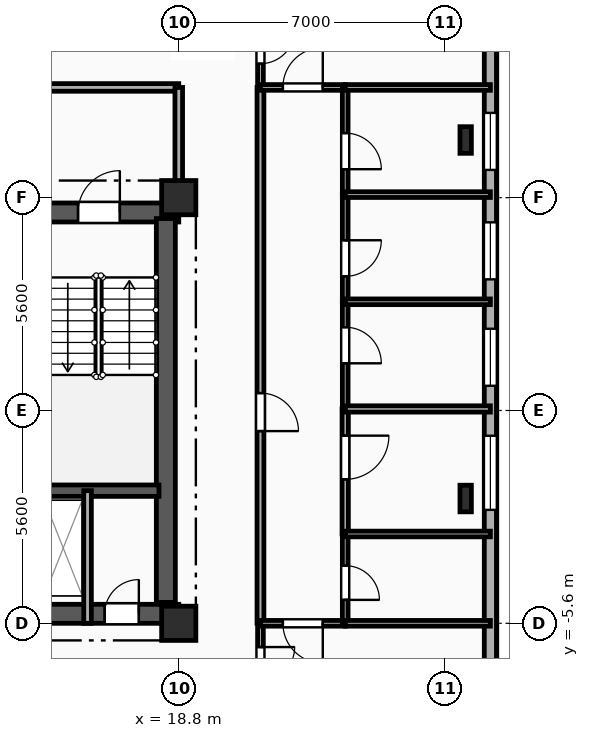
"""IFC4 building model, lengths in metres.
Left out: names, types, materials, properties, quantities, classifications, styles, units other than length and angle.
Written with IfcOpenShell. Run it as: python <this file> out.ifc"""

import sys

from ifc_helpers import new_model, si_unit, direction, frame, frame_2d, origin, origin_2d, place, context, subcontext, project, spatial, rectangle, i_section, extrude, element, fill, save


model = new_model("IFC4")
c1 = context("Model", 3, precision=1e-05, world=origin(), true_north=direction((0.0, 1.0)))
c2 = subcontext(c1, "Body", "Model", "MODEL_VIEW")
j1 = project(units=[si_unit("LENGTHUNIT", "METRE"), si_unit("PLANEANGLEUNIT", "RADIAN")], contexts=[c1])
p1 = place(None, origin())
s1 = spatial("IfcSite", under=j1, at=p1, CompositionType="ELEMENT")
p2 = place(p1, origin())
s2 = spatial("IfcBuilding", under=s1, at=p2, CompositionType="ELEMENT")
p3 = place(p2, frame((0.0, 0.0, 157.8)))
s3 = spatial("IfcBuildingStorey", under=s2, at=p3, CompositionType="ELEMENT", Elevation=157.8)
for number, where, z_axis, x_axis in (
    (1, (18.8, -5.6, 0.0), (0.0, 0.0, 1.0), (1.0, 0.0, 0.0)),
    (2, (18.8, 5.6, 0.0), (0.0, 0.0, 1.0), (1.0, 0.0, 0.0)),
):
    element("IfcColumn", number, at=place(p3, frame(where, z_axis=z_axis, x_axis=x_axis)), inside=s3, PredefinedType="COLUMN", context=c2, shape_type="SweptSolid", body=[
        extrude(rectangle(XDim=0.9, YDim=0.9, at=origin_2d()), origin(), (0.0, 0.0, 1.0), 3.35),
    ])
for number, where, z_axis, x_axis in (
    (3, (26.35, -2.317, 0.0), (0.0, 0.0, 1.0), (1.0, 0.0, 0.0)),
    (4, (26.35, 7.117, 0.0), (0.0, 0.0, 1.0), (1.0, 0.0, 0.0)),
):
    element("IfcColumn", number, at=place(p3, frame(where, z_axis=z_axis, x_axis=x_axis)), inside=s3, PredefinedType="COLUMN", context=c2, shape_type="SweptSolid", body=[
        extrude(i_section(OverallWidth=0.3, OverallDepth=0.7, WebThickness=0.017, FlangeThickness=0.032, FilletRadius=0.027, at=origin_2d()), origin(), (0.0, 0.0, 1.0), 3.35),
    ])
p4 = place(p3, frame((27.0, 17.2, 0.0), z_axis=(0.0, 0.0, 1.0), x_axis=(0.0, -1.0, 0.0)))
e5 = element("IfcWall", 5, at=p4, inside=s3, PredefinedType="SOLIDWALL", context=c2, shape_type="SweptSolid", body=[
    extrude(rectangle(XDim=29.6, YDim=0.32, at=frame_2d((14.8, 0.0))), origin(), (0.0, 0.0, 1.0), 3.04),
])
p5 = place(p4, frame((3.775, 0.0, 0.85)))
e6 = element("IfcOpeningElement", 6, at=p5, cuts=e5, PredefinedType="OPENING", context=c2, shape_type="SweptSolid", body=[
    extrude(rectangle(XDim=1.65, YDim=1.85, at=frame_2d((0.825, 0.925))), frame((0.0, 0.17, 0.0), z_axis=(0.0, -1.0, 0.0), x_axis=(1.0, 0.0, 0.0)), (0.0, 0.0, 1.0), 0.34),
])
p6 = place(p4, frame((9.37, 0.0, 0.85)))
e7 = element("IfcOpeningElement", 7, at=p6, cuts=e5, PredefinedType="OPENING", context=c2, shape_type="SweptSolid", body=[
    extrude(rectangle(XDim=1.5, YDim=1.85, at=frame_2d((0.75, 0.925))), frame((0.0, 0.17, 0.0), z_axis=(0.0, -1.0, 0.0), x_axis=(1.0, 0.0, 0.0)), (0.0, 0.0, 1.0), 0.34),
])
p7 = place(p4, frame((12.25, 0.0, 0.85)))
e8 = element("IfcOpeningElement", 8, at=p7, cuts=e5, PredefinedType="OPENING", context=c2, shape_type="SweptSolid", body=[
    extrude(rectangle(XDim=1.5, YDim=1.85, at=frame_2d((0.75, 0.925))), frame((0.0, 0.17, 0.0), z_axis=(0.0, -1.0, 0.0), x_axis=(1.0, 0.0, 0.0)), (0.0, 0.0, 1.0), 0.34),
])
p8 = place(p4, frame((15.05, 0.0, 0.85)))
e9 = element("IfcOpeningElement", 9, at=p8, cuts=e5, PredefinedType="OPENING", context=c2, shape_type="SweptSolid", body=[
    extrude(rectangle(XDim=1.5, YDim=1.85, at=frame_2d((0.75, 0.925))), frame((0.0, 0.17, 0.0), z_axis=(0.0, -1.0, 0.0), x_axis=(1.0, 0.0, 0.0)), (0.0, 0.0, 1.0), 0.34),
])
p9 = place(p4, frame((17.865, 0.0, 0.85)))
e10 = element("IfcOpeningElement", 10, at=p9, cuts=e5, PredefinedType="OPENING", context=c2, shape_type="SweptSolid", body=[
    extrude(rectangle(XDim=1.95, YDim=1.85, at=frame_2d((0.975, 0.925))), frame((0.0, 0.17, 0.0), z_axis=(0.0, -1.0, 0.0), x_axis=(1.0, 0.0, 0.0)), (0.0, 0.0, 1.0), 0.34),
])
p10 = place(p4, frame((25.175, 0.0, 0.85)))
e11 = element("IfcOpeningElement", 11, at=p10, cuts=e5, PredefinedType="OPENING", context=c2, shape_type="SweptSolid", body=[
    extrude(rectangle(XDim=1.65, YDim=1.85, at=frame_2d((0.825, 0.925))), frame((0.0, 0.17, 0.0), z_axis=(0.0, -1.0, 0.0), x_axis=(1.0, 0.0, 0.0)), (0.0, 0.0, 1.0), 0.34),
])
p11 = place(p3, frame((9.2, 5.21, 0.0), z_axis=(0.0, 0.0, 1.0), x_axis=(1.0, 0.0, 0.0)))
e12 = element("IfcWall", 12, at=p11, inside=s3, PredefinedType="SHEAR", context=c2, shape_type="SweptSolid", body=[
    extrude(rectangle(XDim=9.6, YDim=0.5, at=frame_2d((4.8, 0.0))), origin(), (0.0, 0.0, 1.0), 3.04),
])
p12 = place(p11, frame((6.95, 0.0, 0.0)))
e13 = element("IfcOpeningElement", 13, at=p12, cuts=e12, PredefinedType="OPENING", context=c2, shape_type="SweptSolid", body=[
    extrude(rectangle(XDim=1.1, YDim=2.15, at=frame_2d((0.55, 1.075))), frame((0.0, 0.26, 0.0), z_axis=(0.0, -1.0, 0.0), x_axis=(1.0, 0.0, 0.0)), (0.0, 0.0, 1.0), 0.52),
])
p13 = place(p11, frame((3.775, 0.0, 0.0)))
e14 = element("IfcOpeningElement", 14, at=p13, cuts=e12, PredefinedType="OPENING", context=c2, shape_type="SweptSolid", body=[
    extrude(rectangle(XDim=1.05, YDim=2.1, at=frame_2d((0.525, 1.05))), frame((0.0, 0.26, 0.0), z_axis=(0.0, -1.0, 0.0), x_axis=(1.0, 0.0, 0.0)), (0.0, 0.0, 1.0), 0.52),
])
p14 = place(p3, frame((9.2, -5.35, 0.0), z_axis=(0.0, 0.0, 1.0), x_axis=(1.0, 0.0, 0.0)))
e15 = element("IfcWall", 15, at=p14, inside=s3, PredefinedType="SHEAR", context=c2, shape_type="SweptSolid", body=[
    extrude(rectangle(XDim=9.6, YDim=0.5, at=frame_2d((4.8, 0.0))), origin(), (0.0, 0.0, 1.0), 3.04),
])
p15 = place(p14, frame((7.65, 0.0, 0.0)))
e16 = element("IfcOpeningElement", 16, at=p15, cuts=e15, PredefinedType="OPENING", context=c2, shape_type="SweptSolid", body=[
    extrude(rectangle(XDim=0.9, YDim=2.1, at=frame_2d((0.45, 1.05))), frame((0.0, 0.26, 0.0), z_axis=(0.0, -1.0, 0.0), x_axis=(1.0, 0.0, 0.0)), (0.0, 0.0, 1.0), 0.52),
])
p16 = place(p3, frame((18.46, -5.05, 0.0), z_axis=(0.0, 0.0, 1.0), x_axis=(0.0, 1.0, 0.0)))
e17 = element("IfcWall", 17, at=p16, inside=s3, PredefinedType="SHEAR", context=c2, shape_type="SweptSolid", body=[
    extrude(rectangle(XDim=10.1, YDim=0.5, at=frame_2d((5.05, 0.0))), origin(), (0.0, 0.0, 1.0), 3.04),
])
p17 = place(p3, frame((15.1, -2.11, 0.0), z_axis=(0.0, 0.0, 1.0), x_axis=(1.0, 0.0, 0.0)))
e18 = element("IfcWall", 18, at=p17, inside=s3, PredefinedType="SHEAR", context=c2, shape_type="SweptSolid", body=[
    extrude(rectangle(XDim=3.18, YDim=0.3, at=frame_2d((1.59, 0.0))), origin(), (0.0, 0.0, 1.0), 3.04),
])
p18 = place(p3, frame((16.4, -2.11, 0.0), z_axis=(0.0, 0.0, 1.0), x_axis=(0.0, -1.0, 0.0)))
e19 = element("IfcWall", 19, at=p18, inside=s3, PredefinedType="PARTITIONING", context=c2, shape_type="SweptSolid", body=[
    extrude(rectangle(XDim=3.49, YDim=0.2, at=frame_2d((1.745, 0.0))), origin(), (0.0, 0.0, 1.0), 3.04),
])
p19 = place(p3, frame((18.8, 8.5, 0.0), z_axis=(0.0, 0.0, 1.0), x_axis=(-1.0, 0.0, 0.0)))
e20 = element("IfcWall", 20, at=p19, inside=s3, PredefinedType="PARTITIONING", context=c2, shape_type="SweptSolid", body=[
    extrude(rectangle(XDim=6.8, YDim=0.2, at=frame_2d((3.4, 0.0))), origin(), (0.0, 0.0, 1.0), 3.04),
])
p20 = place(p19, frame((3.985, 0.0, 0.0)))
e21 = element("IfcOpeningElement", 21, at=p20, cuts=e20, PredefinedType="OPENING", context=c2, shape_type="SweptSolid", body=[
    extrude(rectangle(XDim=1.1, YDim=2.15, at=frame_2d((0.55, 1.075))), frame((0.0, 0.11, 0.0), z_axis=(0.0, -1.0, 0.0), x_axis=(1.0, 0.0, 0.0)), (0.0, 0.0, 1.0), 0.22),
])
p21 = place(p3, frame((18.8, 5.6, 0.0), z_axis=(0.0, 0.0, 1.0), x_axis=(0.0, 1.0, 0.0)))
e22 = element("IfcWall", 22, at=p21, inside=s3, PredefinedType="PARTITIONING", context=c2, shape_type="SweptSolid", body=[
    extrude(rectangle(XDim=2.9, YDim=0.2, at=frame_2d((1.45, 0.0))), origin(), (0.0, 0.0, 1.0), 2.525),
])
p22 = place(p3, frame((20.95, 10.65, 0.0), z_axis=(0.0, 0.0, 1.0), x_axis=(0.0, -1.0, 0.0)))
e23 = element("IfcWall", 23, at=p22, inside=s3, PredefinedType="PARTITIONING", context=c2, shape_type="SweptSolid", body=[
    extrude(rectangle(XDim=2.15, YDim=0.15, at=frame_2d((1.075, 0.0))), origin(), (0.0, 0.0, 1.0), 3.04),
])
p23 = place(p22, frame((0.625, 0.0, 0.0)))
e24 = element("IfcOpeningElement", 24, at=p23, cuts=e23, PredefinedType="OPENING", context=c2, shape_type="SweptSolid", body=[
    extrude(rectangle(XDim=0.9, YDim=2.1, at=frame_2d((0.45, 1.05))), frame((0.0, 0.085, 0.0), z_axis=(0.0, -1.0, 0.0), x_axis=(1.0, 0.0, 0.0)), (0.0, 0.0, 1.0), 0.17),
])
p24 = place(p3, frame((20.95, -5.6, 0.0), z_axis=(0.0, 0.0, 1.0), x_axis=(0.0, -1.0, 0.0)))
e25 = element("IfcWall", 25, at=p24, inside=s3, PredefinedType="PARTITIONING", context=c2, shape_type="SweptSolid", body=[
    extrude(rectangle(XDim=2.15, YDim=0.15, at=frame_2d((1.075, 0.0))), origin(), (0.0, 0.0, 1.0), 3.04),
])
p25 = place(p24, frame((0.625, 0.0, 0.0)))
e26 = element("IfcOpeningElement", 26, at=p25, cuts=e25, PredefinedType="OPENING", context=c2, shape_type="SweptSolid", body=[
    extrude(rectangle(XDim=0.9, YDim=2.1, at=frame_2d((0.45, 1.05))), frame((0.0, 0.085, 0.0), z_axis=(0.0, -1.0, 0.0), x_axis=(1.0, 0.0, 0.0)), (0.0, 0.0, 1.0), 0.17),
])
p26 = place(p3, frame((20.95, 8.5, 0.0), z_axis=(0.0, 0.0, 1.0), x_axis=(0.0, -1.0, 0.0)))
e27 = element("IfcWall", 27, at=p26, inside=s3, PredefinedType="PARTITIONING", context=c2, shape_type="SweptSolid", body=[
    extrude(rectangle(XDim=14.1, YDim=0.18, at=frame_2d((7.05, 0.0))), origin(), (0.0, 0.0, 1.0), 3.04),
])
p27 = place(p26, frame((8.042, 0.0, 0.0)))
e28 = element("IfcOpeningElement", 28, at=p27, cuts=e27, PredefinedType="OPENING", context=c2, shape_type="SweptSolid", body=[
    extrude(rectangle(XDim=1.0, YDim=2.15, at=frame_2d((0.5, 1.075))), frame((0.0, 0.1, 0.0), z_axis=(0.0, -1.0, 0.0), x_axis=(1.0, 0.0, 0.0)), (0.0, 0.0, 1.0), 0.2),
])
p28 = place(p3, frame((20.95, 8.5, 0.0), z_axis=(0.0, 0.0, 1.0), x_axis=(1.0, 0.0, 0.0)))
e29 = element("IfcWall", 29, at=p28, inside=s3, PredefinedType="PARTITIONING", context=c2, shape_type="SweptSolid", body=[
    extrude(rectangle(XDim=2.23, YDim=0.15, at=frame_2d((1.115, 0.0))), origin(), (0.0, 0.0, 1.0), 3.04),
])
p29 = place(p28, frame((0.59, 0.0, 0.0)))
e30 = element("IfcOpeningElement", 30, at=p29, cuts=e29, PredefinedType="OPENING", context=c2, shape_type="SweptSolid", body=[
    extrude(rectangle(XDim=1.05, YDim=2.15, at=frame_2d((0.525, 1.075))), frame((0.0, 0.085, 0.0), z_axis=(0.0, -1.0, 0.0), x_axis=(1.0, 0.0, 0.0)), (0.0, 0.0, 1.0), 0.17),
])
p30 = place(p3, frame((23.18, -5.6, 0.0), z_axis=(0.0, 0.0, 1.0), x_axis=(-1.0, 0.0, 0.0)))
e31 = element("IfcWall", 31, at=p30, inside=s3, PredefinedType="PARTITIONING", context=c2, shape_type="SweptSolid", body=[
    extrude(rectangle(XDim=2.23, YDim=0.15, at=frame_2d((1.115, 0.0))), origin(), (0.0, 0.0, 1.0), 3.04),
])
p31 = place(p30, frame((0.59, 0.0, 0.0)))
e32 = element("IfcOpeningElement", 32, at=p31, cuts=e31, PredefinedType="OPENING", context=c2, shape_type="SweptSolid", body=[
    extrude(rectangle(XDim=1.05, YDim=2.15, at=frame_2d((0.525, 1.075))), frame((0.0, 0.085, 0.0), z_axis=(0.0, -1.0, 0.0), x_axis=(1.0, 0.0, 0.0)), (0.0, 0.0, 1.0), 0.17),
])
p32 = place(p3, frame((23.18, -3.25, 0.0), z_axis=(0.0, 0.0, 1.0), x_axis=(0.0, -1.0, 0.0)))
e33 = element("IfcWall", 33, at=p32, inside=s3, PredefinedType="PLUMBINGWALL", context=c2, shape_type="SweptSolid", body=[
    extrude(rectangle(XDim=2.35, YDim=0.15, at=frame_2d((1.175, 0.0))), origin(), (0.0, 0.0, 1.0), 3.04),
])
p33 = place(p32, frame((0.834, 0.0, 0.0)))
e34 = element("IfcOpeningElement", 34, at=p33, cuts=e33, PredefinedType="OPENING", context=c2, shape_type="SweptSolid", body=[
    extrude(rectangle(XDim=0.9, YDim=2.1, at=frame_2d((0.45, 1.05))), frame((0.0, 0.085, 0.0), z_axis=(0.0, -1.0, 0.0), x_axis=(1.0, 0.0, 0.0)), (0.0, 0.0, 1.0), 0.17),
])
p34 = place(p3, frame((23.18, 0.04, 0.0), z_axis=(0.0, 0.0, 1.0), x_axis=(0.0, -1.0, 0.0)))
e35 = element("IfcWall", 35, at=p34, inside=s3, PredefinedType="PARTITIONING", context=c2, shape_type="SweptSolid", body=[
    extrude(rectangle(XDim=3.29, YDim=0.165, at=frame_2d((1.645, 0.0))), origin(), (0.0, 0.0, 1.0), 3.04),
])
p35 = place(p34, frame((0.702, 0.0, 0.0)))
e36 = element("IfcOpeningElement", 36, at=p35, cuts=e35, PredefinedType="OPENING", context=c2, shape_type="SweptSolid", body=[
    extrude(rectangle(XDim=1.15, YDim=2.15, at=frame_2d((0.575, 1.075))), frame((0.0, 0.093, 0.0), z_axis=(0.0, -1.0, 0.0), x_axis=(1.0, 0.0, 0.0)), (0.0, 0.0, 1.0), 0.185),
])
p36 = place(p3, frame((23.18, 2.86, 0.0), z_axis=(0.0, 0.0, 1.0), x_axis=(0.0, -1.0, 0.0)))
e37 = element("IfcWall", 37, at=p36, inside=s3, PredefinedType="PARTITIONING", context=c2, shape_type="SweptSolid", body=[
    extrude(rectangle(XDim=2.82, YDim=0.15, at=frame_2d((1.41, 0.0))), origin(), (0.0, 0.0, 1.0), 3.04),
])
p37 = place(p36, frame((0.669, 0.0, 0.0)))
e38 = element("IfcOpeningElement", 38, at=p37, cuts=e37, PredefinedType="OPENING", context=c2, shape_type="SweptSolid", body=[
    extrude(rectangle(XDim=0.95, YDim=2.1, at=frame_2d((0.475, 1.05))), frame((0.0, 0.085, 0.0), z_axis=(0.0, -1.0, 0.0), x_axis=(1.0, 0.0, 0.0)), (0.0, 0.0, 1.0), 0.17),
])
p38 = place(p3, frame((23.18, 5.68, 0.0), z_axis=(0.0, 0.0, 1.0), x_axis=(0.0, -1.0, 0.0)))
e39 = element("IfcWall", 39, at=p38, inside=s3, PredefinedType="PARTITIONING", context=c2, shape_type="SweptSolid", body=[
    extrude(rectangle(XDim=2.82, YDim=0.15, at=frame_2d((1.41, 0.0))), origin(), (0.0, 0.0, 1.0), 3.04),
])
p39 = place(p38, frame((1.201, 0.0, 0.0)))
e40 = element("IfcOpeningElement", 40, at=p39, cuts=e39, PredefinedType="OPENING", context=c2, shape_type="SweptSolid", body=[
    extrude(rectangle(XDim=0.95, YDim=2.1, at=frame_2d((0.475, 1.05))), frame((0.0, 0.085, 0.0), z_axis=(0.0, -1.0, 0.0), x_axis=(1.0, 0.0, 0.0)), (0.0, 0.0, 1.0), 0.17),
])
p40 = place(p3, frame((23.18, 8.5, 0.0), z_axis=(0.0, 0.0, 1.0), x_axis=(0.0, -1.0, 0.0)))
e41 = element("IfcWall", 41, at=p40, inside=s3, PredefinedType="PARTITIONING", context=c2, shape_type="SweptSolid", body=[
    extrude(rectangle(XDim=2.82, YDim=0.15, at=frame_2d((1.41, 0.0))), origin(), (0.0, 0.0, 1.0), 3.04),
])
p41 = place(p40, frame((1.201, 0.0, 0.0)))
e42 = element("IfcOpeningElement", 42, at=p41, cuts=e41, PredefinedType="OPENING", context=c2, shape_type="SweptSolid", body=[
    extrude(rectangle(XDim=0.95, YDim=2.1, at=frame_2d((0.475, 1.05))), frame((0.0, 0.085, 0.0), z_axis=(0.0, -1.0, 0.0), x_axis=(1.0, 0.0, 0.0)), (0.0, 0.0, 1.0), 0.17),
])
p42 = place(p3, frame((27.0, 8.5, 0.0), z_axis=(0.0, 0.0, 1.0), x_axis=(-1.0, 0.0, 0.0)))
e43 = element("IfcWall", 43, at=p42, inside=s3, PredefinedType="PARTITIONING", context=c2, shape_type="SweptSolid", body=[
    extrude(rectangle(XDim=3.82, YDim=0.15, at=frame_2d((1.91, 0.0))), origin(), (0.0, 0.0, 1.0), 3.04),
])
for number, where, z_axis, x_axis in (
    (44, (23.18, -5.6, 0.0), (0.0, 0.0, 1.0), (1.0, 0.0, 0.0)),
    (45, (23.18, -3.25, 0.0), (0.0, 0.0, 1.0), (1.0, 0.0, 0.0)),
):
    element("IfcWall", number, at=place(p3, frame(where, z_axis=z_axis, x_axis=x_axis)), inside=s3, PredefinedType="PLUMBINGWALL", context=c2, shape_type="SweptSolid", body=[
        extrude(rectangle(XDim=3.82, YDim=0.15, at=frame_2d((1.91, 0.0))), origin(), (0.0, 0.0, 1.0), 3.04),
    ])
p43 = place(p3, frame((23.18, 0.04, 0.0), z_axis=(0.0, 0.0, 1.0), x_axis=(1.0, 0.0, 0.0)))
e46 = element("IfcWall", 46, at=p43, inside=s3, PredefinedType="PARTITIONING", context=c2, shape_type="SweptSolid", body=[
    extrude(rectangle(XDim=3.82, YDim=0.165, at=frame_2d((1.91, 0.0))), origin(), (0.0, 0.0, 1.0), 3.04),
])
for number, where, z_axis, x_axis in (
    (47, (23.18, 2.86, 0.0), (0.0, 0.0, 1.0), (1.0, 0.0, 0.0)),
    (48, (23.18, 5.68, 0.0), (0.0, 0.0, 1.0), (1.0, 0.0, 0.0)),
):
    element("IfcWall", number, at=place(p3, frame(where, z_axis=z_axis, x_axis=x_axis)), inside=s3, PredefinedType="PARTITIONING", context=c2, shape_type="SweptSolid", body=[
        extrude(rectangle(XDim=3.82, YDim=0.15, at=frame_2d((1.91, 0.0))), origin(), (0.0, 0.0, 1.0), 3.04),
    ])
p44 = place(p6, origin())
e49 = element("IfcWindow", 49, at=p44, inside=s3, PartitioningType="SINGLE_PANEL", PredefinedType="WINDOW", context=c2, shape_type="SweptSolid", body=[
    extrude(rectangle(XDim=1.5, YDim=1.85, at=frame_2d((0.75, 0.925))), frame((0.0, 0.03, 0.0), z_axis=(0.0, -1.0, 0.0), x_axis=(1.0, 0.0, 0.0)), (0.0, 0.0, 1.0), 0.06),
])
fill(e7, e49)
p45 = place(p7, origin())
e50 = element("IfcWindow", 50, at=p45, inside=s3, PartitioningType="SINGLE_PANEL", PredefinedType="WINDOW", context=c2, shape_type="SweptSolid", body=[
    extrude(rectangle(XDim=1.5, YDim=1.85, at=frame_2d((0.75, 0.925))), frame((0.0, 0.03, 0.0), z_axis=(0.0, -1.0, 0.0), x_axis=(1.0, 0.0, 0.0)), (0.0, 0.0, 1.0), 0.06),
])
fill(e8, e50)
p46 = place(p8, origin())
e51 = element("IfcWindow", 51, at=p46, inside=s3, PartitioningType="SINGLE_PANEL", PredefinedType="WINDOW", context=c2, shape_type="SweptSolid", body=[
    extrude(rectangle(XDim=1.5, YDim=1.85, at=frame_2d((0.75, 0.925))), frame((0.0, 0.03, 0.0), z_axis=(0.0, -1.0, 0.0), x_axis=(1.0, 0.0, 0.0)), (0.0, 0.0, 1.0), 0.06),
])
fill(e9, e51)
p47 = place(p9, origin())
e52 = element("IfcWindow", 52, at=p47, inside=s3, PartitioningType="SINGLE_PANEL", PredefinedType="WINDOW", context=c2, shape_type="SweptSolid", body=[
    extrude(rectangle(XDim=1.95, YDim=1.85, at=frame_2d((0.975, 0.925))), frame((0.0, 0.03, 0.0), z_axis=(0.0, -1.0, 0.0), x_axis=(1.0, 0.0, 0.0)), (0.0, 0.0, 1.0), 0.06),
])
fill(e10, e52)
p48 = place(p12, origin())
e53 = element("IfcDoor", 53, at=p48, inside=s3, OperationType="SINGLE_SWING_RIGHT", PredefinedType="DOOR", context=c2, shape_type="SweptSolid", body=[
    extrude(rectangle(XDim=1.1, YDim=2.15, at=frame_2d((0.55, 1.075))), frame((0.0, 0.025, 0.0), z_axis=(0.0, -1.0, 0.0), x_axis=(1.0, 0.0, 0.0)), (0.0, 0.0, 1.0), 0.05),
])
fill(e13, e53)
p49 = place(p15, origin())
e54 = element("IfcDoor", 54, at=p49, inside=s3, OperationType="SINGLE_SWING_RIGHT", PredefinedType="DOOR", context=c2, shape_type="SweptSolid", body=[
    extrude(rectangle(XDim=0.9, YDim=2.1, at=frame_2d((0.45, 1.05))), frame((0.0, 0.025, 0.0), z_axis=(0.0, -1.0, 0.0), x_axis=(1.0, 0.0, 0.0)), (0.0, 0.0, 1.0), 0.05),
])
fill(e16, e54)
p50 = place(p23, origin())
e55 = element("IfcDoor", 55, at=p50, inside=s3, OperationType="SINGLE_SWING_LEFT", PredefinedType="DOOR", context=c2, shape_type="SweptSolid", body=[
    extrude(rectangle(XDim=0.9, YDim=2.1, at=frame_2d((0.45, 1.05))), frame((0.0, 0.025, 0.0), z_axis=(0.0, -1.0, 0.0), x_axis=(1.0, 0.0, 0.0)), (0.0, 0.0, 1.0), 0.05),
])
fill(e24, e55)
p51 = place(p25, origin())
e56 = element("IfcDoor", 56, at=p51, inside=s3, OperationType="SINGLE_SWING_LEFT", PredefinedType="DOOR", context=c2, shape_type="SweptSolid", body=[
    extrude(rectangle(XDim=0.9, YDim=2.1, at=frame_2d((0.45, 1.05))), frame((0.0, 0.025, 0.0), z_axis=(0.0, -1.0, 0.0), x_axis=(1.0, 0.0, 0.0)), (0.0, 0.0, 1.0), 0.05),
])
fill(e26, e56)
p52 = place(p27, origin())
e57 = element("IfcDoor", 57, at=p52, inside=s3, OperationType="SINGLE_SWING_RIGHT", PredefinedType="DOOR", context=c2, shape_type="SweptSolid", body=[
    extrude(rectangle(XDim=1.0, YDim=2.15, at=frame_2d((0.5, 1.075))), frame((0.0, 0.025, 0.0), z_axis=(0.0, -1.0, 0.0), x_axis=(1.0, 0.0, 0.0)), (0.0, 0.0, 1.0), 0.05),
])
fill(e28, e57)
p53 = place(p29, origin())
e58 = element("IfcDoor", 58, at=p53, inside=s3, OperationType="SINGLE_SWING_RIGHT", PredefinedType="DOOR", context=c2, shape_type="SweptSolid", body=[
    extrude(rectangle(XDim=1.05, YDim=2.15, at=frame_2d((0.525, 1.075))), frame((0.0, 0.025, 0.0), z_axis=(0.0, -1.0, 0.0), x_axis=(1.0, 0.0, 0.0)), (0.0, 0.0, 1.0), 0.05),
])
fill(e30, e58)
p54 = place(p31, origin())
e59 = element("IfcDoor", 59, at=p54, inside=s3, OperationType="SINGLE_SWING_LEFT", PredefinedType="DOOR", context=c2, shape_type="SweptSolid", body=[
    extrude(rectangle(XDim=1.05, YDim=2.15, at=frame_2d((0.525, 1.075))), frame((0.0, 0.025, 0.0), z_axis=(0.0, -1.0, 0.0), x_axis=(1.0, 0.0, 0.0)), (0.0, 0.0, 1.0), 0.05),
])
fill(e32, e59)
p55 = place(p33, origin())
e60 = element("IfcDoor", 60, at=p55, inside=s3, OperationType="SINGLE_SWING_RIGHT", PredefinedType="DOOR", context=c2, shape_type="SweptSolid", body=[
    extrude(rectangle(XDim=0.9, YDim=2.1, at=frame_2d((0.45, 1.05))), frame((0.0, 0.025, 0.0), z_axis=(0.0, -1.0, 0.0), x_axis=(1.0, 0.0, 0.0)), (0.0, 0.0, 1.0), 0.05),
])
fill(e34, e60)
p56 = place(p35, origin())
e61 = element("IfcDoor", 61, at=p56, inside=s3, OperationType="SINGLE_SWING_LEFT", PredefinedType="DOOR", context=c2, shape_type="SweptSolid", body=[
    extrude(rectangle(XDim=1.15, YDim=2.15, at=frame_2d((0.575, 1.075))), frame((0.0, 0.025, 0.0), z_axis=(0.0, -1.0, 0.0), x_axis=(1.0, 0.0, 0.0)), (0.0, 0.0, 1.0), 0.05),
])
fill(e36, e61)
p57 = place(p37, origin())
e62 = element("IfcDoor", 62, at=p57, inside=s3, OperationType="SINGLE_SWING_RIGHT", PredefinedType="DOOR", context=c2, shape_type="SweptSolid", body=[
    extrude(rectangle(XDim=0.95, YDim=2.1, at=frame_2d((0.475, 1.05))), frame((0.0, 0.025, 0.0), z_axis=(0.0, -1.0, 0.0), x_axis=(1.0, 0.0, 0.0)), (0.0, 0.0, 1.0), 0.05),
])
fill(e38, e62)
p58 = place(p39, origin())
e63 = element("IfcDoor", 63, at=p58, inside=s3, OperationType="SINGLE_SWING_LEFT", PredefinedType="DOOR", context=c2, shape_type="SweptSolid", body=[
    extrude(rectangle(XDim=0.95, YDim=2.1, at=frame_2d((0.475, 1.05))), frame((0.0, 0.025, 0.0), z_axis=(0.0, -1.0, 0.0), x_axis=(1.0, 0.0, 0.0)), (0.0, 0.0, 1.0), 0.05),
])
fill(e40, e63)
p59 = place(p41, origin())
e64 = element("IfcDoor", 64, at=p59, inside=s3, OperationType="SINGLE_SWING_RIGHT", PredefinedType="DOOR", context=c2, shape_type="SweptSolid", body=[
    extrude(rectangle(XDim=0.95, YDim=2.1, at=frame_2d((0.475, 1.05))), frame((0.0, 0.025, 0.0), z_axis=(0.0, -1.0, 0.0), x_axis=(1.0, 0.0, 0.0)), (0.0, 0.0, 1.0), 0.05),
])
fill(e42, e64)
save(model, sys.argv[1])
